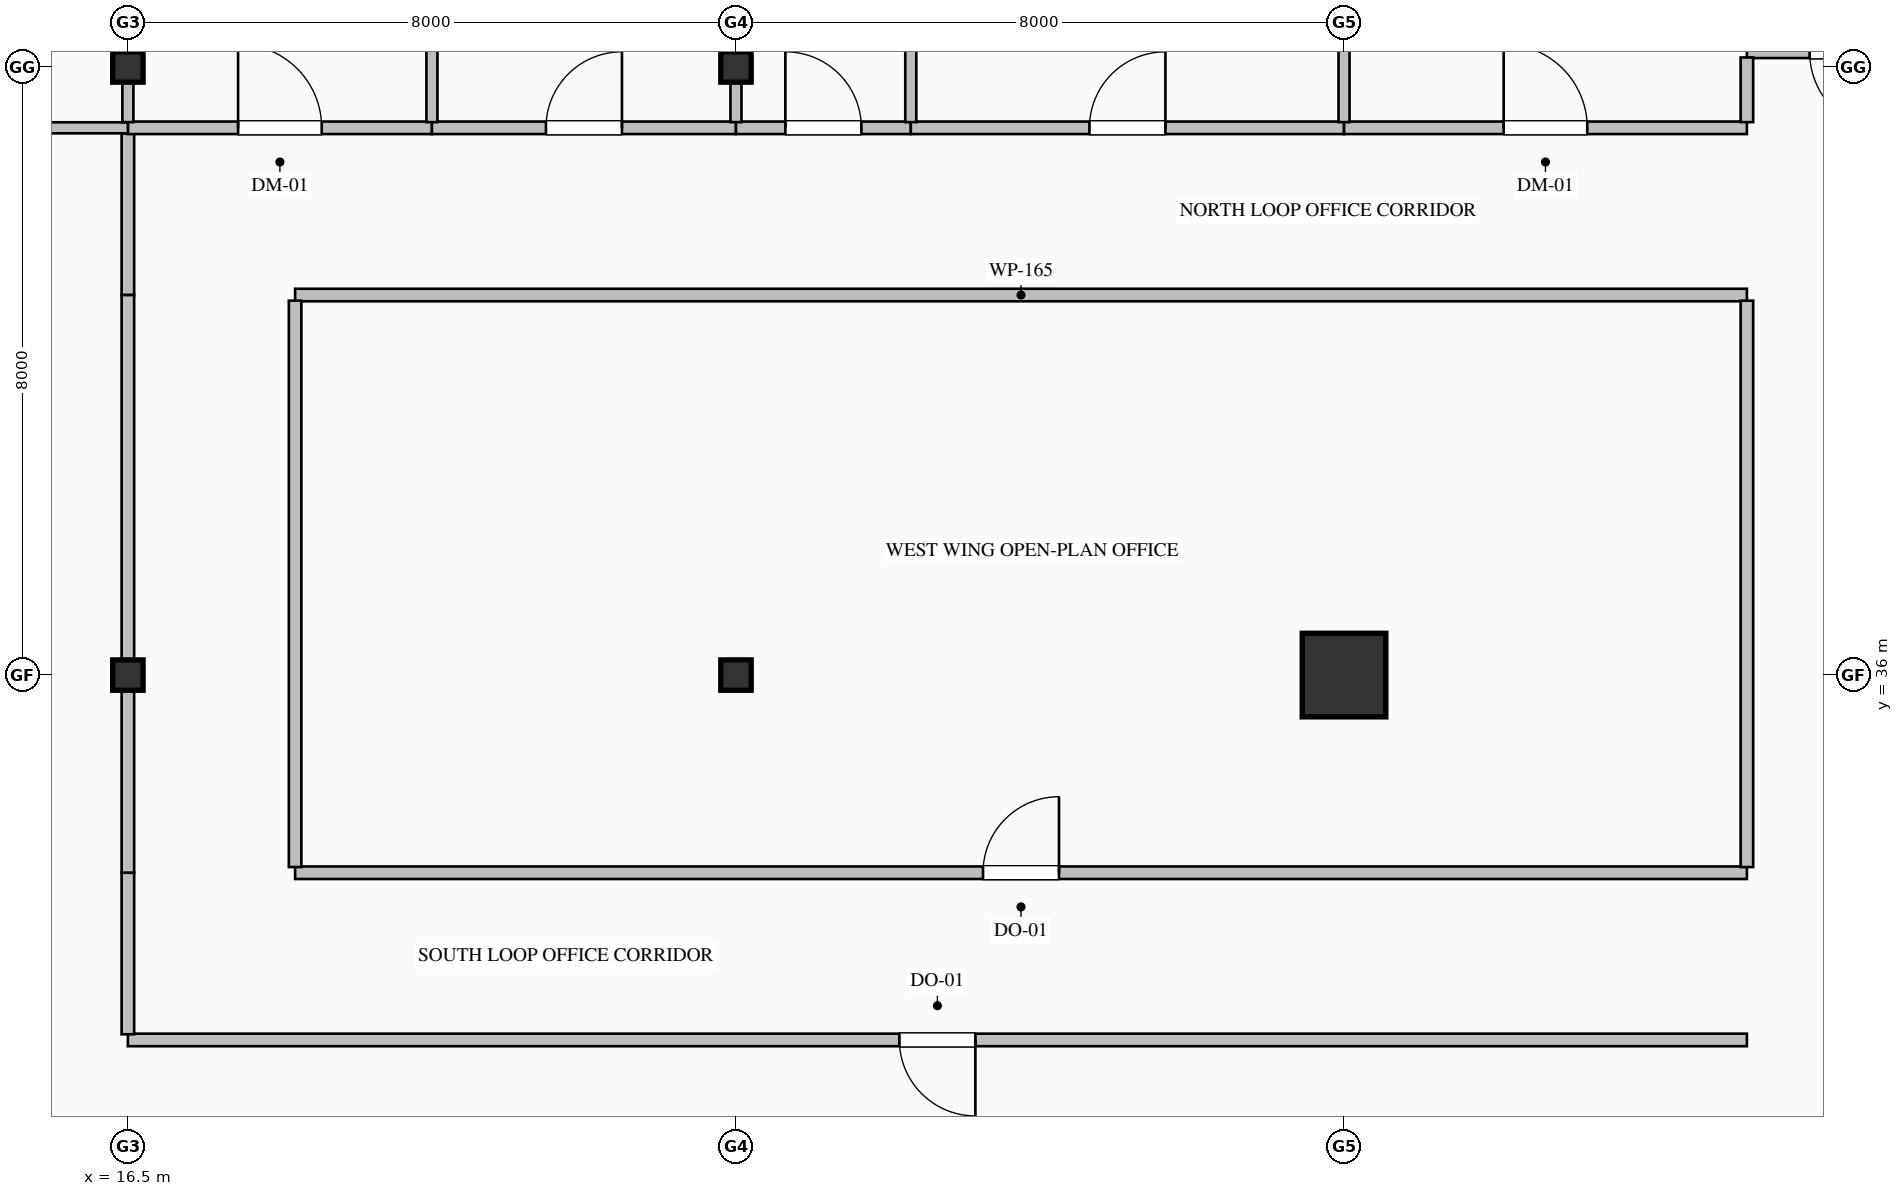
"""IFC4 building model, lengths in metres.
Left out: names, types, materials, properties, quantities, classifications, styles, units other than length and angle.
Written with IfcOpenShell. Run it as: python <this file> out.ifc"""

import sys

from ifc_helpers import new_model, si_unit, direction, frame, frame_2d, origin, origin_2d, place, context, subcontext, project, spatial, rectangle, hollow_rectangle, i_section, extrude, element, fill, save


model = new_model("IFC4")
c1 = context("Model", 3, precision=1e-05, world=origin(), true_north=direction((0.0, 1.0)))
c2 = subcontext(c1, "Body", "Model", "MODEL_VIEW")
j1 = project(units=[si_unit("LENGTHUNIT", "METRE"), si_unit("PLANEANGLEUNIT", "RADIAN")], contexts=[c1])
p1 = place(None, origin())
s1 = spatial("IfcSite", under=j1, at=p1, CompositionType="ELEMENT")
p2 = place(p1, origin())
s2 = spatial("IfcBuilding", under=s1, at=p2, CompositionType="ELEMENT")
p3 = place(p2, frame((0.0, 0.0, 127.0)))
s3 = spatial("IfcBuildingStorey", under=s2, at=p3, CompositionType="ELEMENT", Elevation=127.0)
for number, where, z_axis, x_axis in (
    (1, (16.5, 36.0, 0.0), (0.0, 0.0, 1.0), (1.0, 0.0, 0.0)),
    (2, (16.5, 44.0, 0.0), (0.0, 0.0, 1.0), (1.0, 0.0, 0.0)),
    (3, (24.5, 36.0, 0.0), (0.0, 0.0, 1.0), (1.0, 0.0, 0.0)),
    (4, (24.5, 44.0, 0.0), (0.0, 0.0, 1.0), (1.0, 0.0, 0.0)),
):
    element("IfcColumn", number, at=place(p3, frame(where, z_axis=z_axis, x_axis=x_axis)), inside=s3, PredefinedType="COLUMN", context=c2, shape_type="SweptSolid", body=[
        extrude(i_section(OverallWidth=0.4, OverallDepth=0.4, WebThickness=0.013, FlangeThickness=0.021, FilletRadius=0.022, at=origin_2d()), origin(), (0.0, 0.0, 1.0), 4.0),
    ])
p4 = place(p3, frame((32.5, 36.0, 0.0), z_axis=(0.0, 0.0, 1.0), x_axis=(1.0, 0.0, 0.0)))
e5 = element("IfcColumn", 5, at=p4, inside=s3, PredefinedType="COLUMN", context=c2, shape_type="SweptSolid", body=[
    extrude(hollow_rectangle(XDim=1.1, YDim=1.1, WallThickness=0.04, at=origin_2d()), origin(), (0.0, 0.0, 1.0), 4.0),
])
p5 = place(p3, frame((40.5, 44.2, 0.0), z_axis=(0.0, 0.0, 1.0), x_axis=(-1.0, 0.0, 0.0)))
e6 = element("IfcWall", 6, at=p5, inside=s3, PredefinedType="PARTITIONING", context=c2, shape_type="SweptSolid", body=[
    extrude(rectangle(XDim=2.7, YDim=0.165, at=frame_2d((1.35, 0.0))), origin(), (0.0, 0.0, 1.0), 3.765),
])
p6 = place(p5, frame((0.825, 0.0, 0.0)))
e7 = element("IfcOpeningElement", 7, at=p6, cuts=e6, PredefinedType="OPENING", context=c2, shape_type="SweptSolid", body=[
    extrude(rectangle(XDim=1.05, YDim=2.15, at=frame_2d((0.525, 1.075))), frame((0.0, 0.093, 0.0), z_axis=(0.0, -1.0, 0.0), x_axis=(1.0, 0.0, 0.0)), (0.0, 0.0, 1.0), 0.185),
])
p7 = place(p3, frame((37.8, 31.2, 0.0), z_axis=(0.0, 0.0, 1.0), x_axis=(-1.0, 0.0, 0.0)))
e8 = element("IfcWall", 8, at=p7, inside=s3, PredefinedType="PARTITIONING", context=c2, shape_type="SweptSolid", body=[
    extrude(rectangle(XDim=21.3, YDim=0.165, at=frame_2d((10.65, 0.0))), origin(), (0.0, 0.0, 1.0), 3.765),
])
p8 = place(p7, frame((10.15, 0.0, 0.0)))
e9 = element("IfcOpeningElement", 9, at=p8, cuts=e8, PredefinedType="OPENING", context=c2, shape_type="SweptSolid", body=[
    extrude(rectangle(XDim=1.0, YDim=2.15, at=frame_2d((0.5, 1.075))), frame((0.0, 0.093, 0.0), z_axis=(0.0, -1.0, 0.0), x_axis=(1.0, 0.0, 0.0)), (0.0, 0.0, 1.0), 0.185),
])
p9 = place(p3, frame((16.5, 31.274, 0.0), z_axis=(0.0, 0.0, 1.0), x_axis=(0.0, 1.0, 0.0)))
e10 = element("IfcWall", 10, at=p9, inside=s3, PredefinedType="PARTITIONING", context=c2, shape_type="SweptSolid", body=[
    extrude(rectangle(XDim=2.125, YDim=0.165, at=frame_2d((1.063, 0.0))), origin(), (0.0, 0.0, 1.0), 3.157),
])
p10 = place(p3, frame((18.7, 33.4, 0.0), z_axis=(0.0, 0.0, 1.0), x_axis=(1.0, 0.0, 0.0)))
e11 = element("IfcWall", 11, at=p10, inside=s3, PredefinedType="PARTITIONING", context=c2, shape_type="SweptSolid", body=[
    extrude(rectangle(XDim=19.1, YDim=0.165, at=frame_2d((9.55, 0.0))), origin(), (0.0, 0.0, 1.0), 3.765),
])
p11 = place(p10, frame((9.05, 0.0, 0.0)))
e12 = element("IfcOpeningElement", 12, at=p11, cuts=e11, PredefinedType="OPENING", context=c2, shape_type="SweptSolid", body=[
    extrude(rectangle(XDim=1.0, YDim=2.15, at=frame_2d((0.5, 1.075))), frame((0.0, 0.093, 0.0), z_axis=(0.0, -1.0, 0.0), x_axis=(1.0, 0.0, 0.0)), (0.0, 0.0, 1.0), 0.185),
])
p12 = place(p3, frame((16.5, 41.0, 0.0), z_axis=(0.0, 0.0, 1.0), x_axis=(0.0, 1.0, 0.0)))
e13 = element("IfcWall", 13, at=p12, inside=s3, PredefinedType="PARTITIONING", context=c2, shape_type="SweptSolid", body=[
    extrude(rectangle(XDim=2.125, YDim=0.165, at=frame_2d((1.063, 0.0))), origin(), (0.0, 0.0, 1.0), 3.157),
])
p13 = place(p3, frame((37.8, 41.0, 0.0), z_axis=(0.0, 0.0, 1.0), x_axis=(-1.0, 0.0, 0.0)))
e14 = element("IfcWall", 14, at=p13, inside=s3, PredefinedType="PARTITIONING", context=c2, shape_type="SweptSolid", body=[
    extrude(rectangle(XDim=19.1, YDim=0.165, at=frame_2d((9.55, 0.0))), origin(), (0.0, 0.0, 1.0), 3.765),
])
p14 = place(p3, frame((16.5, 43.2, 0.0), z_axis=(0.0, 0.0, 1.0), x_axis=(1.0, 0.0, 0.0)))
e15 = element("IfcWall", 15, at=p14, inside=s3, PredefinedType="PARTITIONING", context=c2, shape_type="SweptSolid", body=[
    extrude(rectangle(XDim=4.0, YDim=0.165, at=frame_2d((2.0, 0.0))), origin(), (0.0, 0.0, 1.0), 3.765),
])
p15 = place(p14, frame((1.45, 0.0, 0.0)))
e16 = element("IfcOpeningElement", 16, at=p15, cuts=e15, PredefinedType="OPENING", context=c2, shape_type="SweptSolid", body=[
    extrude(rectangle(XDim=1.1, YDim=2.2, at=frame_2d((0.55, 1.1))), frame((0.0, 0.093, 0.0), z_axis=(0.0, -1.0, 0.0), x_axis=(1.0, 0.0, 0.0)), (0.0, 0.0, 1.0), 0.185),
])
p16 = place(p3, frame((20.5, 43.2, 0.0), z_axis=(0.0, 0.0, 1.0), x_axis=(1.0, 0.0, 0.0)))
e17 = element("IfcWall", 17, at=p16, inside=s3, PredefinedType="PARTITIONING", context=c2, shape_type="SweptSolid", body=[
    extrude(rectangle(XDim=4.0, YDim=0.165, at=frame_2d((2.0, 0.0))), origin(), (0.0, 0.0, 1.0), 3.765),
])
p17 = place(p16, frame((1.5, 0.0, 0.0)))
e18 = element("IfcOpeningElement", 18, at=p17, cuts=e17, PredefinedType="OPENING", context=c2, shape_type="SweptSolid", body=[
    extrude(rectangle(XDim=1.0, YDim=2.15, at=frame_2d((0.5, 1.075))), frame((0.0, 0.093, 0.0), z_axis=(0.0, -1.0, 0.0), x_axis=(1.0, 0.0, 0.0)), (0.0, 0.0, 1.0), 0.185),
])
p18 = place(p3, frame((24.5, 43.2, 0.0), z_axis=(0.0, 0.0, 1.0), x_axis=(1.0, 0.0, 0.0)))
e19 = element("IfcWall", 19, at=p18, inside=s3, PredefinedType="PARTITIONING", context=c2, shape_type="SweptSolid", body=[
    extrude(rectangle(XDim=2.3, YDim=0.165, at=frame_2d((1.15, 0.0))), origin(), (0.0, 0.0, 1.0), 3.765),
])
p19 = place(p18, frame((0.65, 0.0, 0.0)))
e20 = element("IfcOpeningElement", 20, at=p19, cuts=e19, PredefinedType="OPENING", context=c2, shape_type="SweptSolid", body=[
    extrude(rectangle(XDim=1.0, YDim=2.15, at=frame_2d((0.5, 1.075))), frame((0.0, 0.093, 0.0), z_axis=(0.0, -1.0, 0.0), x_axis=(1.0, 0.0, 0.0)), (0.0, 0.0, 1.0), 0.185),
])
p20 = place(p3, frame((26.8, 43.2, 0.0), z_axis=(0.0, 0.0, 1.0), x_axis=(1.0, 0.0, 0.0)))
e21 = element("IfcWall", 21, at=p20, inside=s3, PredefinedType="PARTITIONING", context=c2, shape_type="SweptSolid", body=[
    extrude(rectangle(XDim=5.7, YDim=0.165, at=frame_2d((2.85, 0.0))), origin(), (0.0, 0.0, 1.0), 3.765),
])
p21 = place(p20, frame((2.35, 0.0, 0.0)))
e22 = element("IfcOpeningElement", 22, at=p21, cuts=e21, PredefinedType="OPENING", context=c2, shape_type="SweptSolid", body=[
    extrude(rectangle(XDim=1.0, YDim=2.15, at=frame_2d((0.5, 1.075))), frame((0.0, 0.093, 0.0), z_axis=(0.0, -1.0, 0.0), x_axis=(1.0, 0.0, 0.0)), (0.0, 0.0, 1.0), 0.185),
])
p22 = place(p3, frame((32.5, 43.2, 0.0), z_axis=(0.0, 0.0, 1.0), x_axis=(1.0, 0.0, 0.0)))
e23 = element("IfcWall", 23, at=p22, inside=s3, PredefinedType="PARTITIONING", context=c2, shape_type="SweptSolid", body=[
    extrude(rectangle(XDim=5.3, YDim=0.165, at=frame_2d((2.65, 0.0))), origin(), (0.0, 0.0, 1.0), 3.765),
])
p23 = place(p22, frame((2.1, 0.0, 0.0)))
e24 = element("IfcOpeningElement", 24, at=p23, cuts=e23, PredefinedType="OPENING", context=c2, shape_type="SweptSolid", body=[
    extrude(rectangle(XDim=1.1, YDim=2.2, at=frame_2d((0.55, 1.1))), frame((0.0, 0.093, 0.0), z_axis=(0.0, -1.0, 0.0), x_axis=(1.0, 0.0, 0.0)), (0.0, 0.0, 1.0), 0.185),
])
p24 = place(p3, frame((16.5, 33.4, 0.0), z_axis=(0.0, 0.0, 1.0), x_axis=(0.0, 1.0, 0.0)))
e25 = element("IfcWall", 25, at=p24, inside=s3, PredefinedType="PARTITIONING", context=c2, shape_type="SweptSolid", body=[
    extrude(rectangle(XDim=7.6, YDim=0.165, at=frame_2d((3.8, 0.0))), origin(), (0.0, 0.0, 1.0), 3.157),
])
for number, where, z_axis, x_axis in (
    (26, (18.7, 40.926, 0.0), (0.0, 0.0, 1.0), (0.0, -1.0, 0.0)),
    (27, (37.8, 33.475, 0.0), (0.0, 0.0, 1.0), (0.0, 1.0, 0.0)),
):
    element("IfcWall", number, at=place(p3, frame(where, z_axis=z_axis, x_axis=x_axis)), inside=s3, PredefinedType="PARTITIONING", context=c2, shape_type="SweptSolid", body=[
        extrude(rectangle(XDim=7.451, YDim=0.165, at=frame_2d((3.726, 0.0))), origin(), (0.0, 0.0, 1.0), 3.765),
    ])
p25 = place(p3, frame((37.8, 43.274, 0.0), z_axis=(0.0, 0.0, 1.0), x_axis=(0.0, 1.0, 0.0)))
e28 = element("IfcWall", 28, at=p25, inside=s3, PredefinedType="PARTITIONING", context=c2, shape_type="SweptSolid", body=[
    extrude(rectangle(XDim=0.851, YDim=0.165, at=frame_2d((0.426, 0.0))), origin(), (0.0, 0.0, 1.0), 3.765),
])
p26 = place(p3, frame((12.8, 43.2, 0.0), z_axis=(0.0, 0.0, 1.0), x_axis=(1.0, 0.0, 0.0)))
e29 = element("IfcWall", 29, at=p26, inside=s3, PredefinedType="PARTITIONING", context=c2, shape_type="SweptSolid", body=[
    extrude(rectangle(XDim=3.7, YDim=0.145, at=frame_2d((1.85, 0.0))), origin(), (0.0, 0.0, 1.0), 3.765),
])
p27 = place(p3, frame((16.5, 51.668, 0.0), z_axis=(0.0, 0.0, 1.0), x_axis=(0.0, -1.0, 0.0)))
e30 = element("IfcWall", 30, at=p27, inside=s3, PredefinedType="PARTITIONING", context=c2, shape_type="SweptSolid", body=[
    extrude(rectangle(XDim=8.394, YDim=0.145, at=frame_2d((4.197, 0.0))), origin(), (0.0, 0.0, 1.0), 3.157),
])
p28 = place(p27, frame((3.697, 0.0, 0.0)))
e31 = element("IfcOpeningElement", 31, at=p28, cuts=e30, PredefinedType="OPENING", context=c2, shape_type="SweptSolid", body=[
    extrude(rectangle(XDim=1.0, YDim=2.15, at=frame_2d((0.5, 1.075))), frame((0.0, 0.083, 0.0), z_axis=(0.0, -1.0, 0.0), x_axis=(1.0, 0.0, 0.0)), (0.0, 0.0, 1.0), 0.165),
])
p29 = place(p3, frame((20.5, 51.668, 0.0), z_axis=(0.0, 0.0, 1.0), x_axis=(0.0, -1.0, 0.0)))
e32 = element("IfcWall", 32, at=p29, inside=s3, PredefinedType="PARTITIONING", context=c2, shape_type="SweptSolid", body=[
    extrude(rectangle(XDim=8.394, YDim=0.145, at=frame_2d((4.197, 0.0))), origin(), (0.0, 0.0, 1.0), 3.765),
])
p30 = place(p3, frame((24.5, 51.668, 0.0), z_axis=(0.0, 0.0, 1.0), x_axis=(0.0, -1.0, 0.0)))
e33 = element("IfcWall", 33, at=p30, inside=s3, PredefinedType="PARTITIONING", context=c2, shape_type="SweptSolid", body=[
    extrude(rectangle(XDim=8.394, YDim=0.145, at=frame_2d((4.197, 0.0))), origin(), (0.0, 0.0, 1.0), 3.157),
])
for number, where, z_axis, x_axis in (
    (34, (26.8, 51.668, 0.0), (0.0, 0.0, 1.0), (0.0, -1.0, 0.0)),
    (35, (32.5, 51.668, 0.0), (0.0, 0.0, 1.0), (0.0, -1.0, 0.0)),
):
    element("IfcWall", number, at=place(p3, frame(where, z_axis=z_axis, x_axis=x_axis)), inside=s3, PredefinedType="PARTITIONING", context=c2, shape_type="SweptSolid", body=[
        extrude(rectangle(XDim=8.394, YDim=0.145, at=frame_2d((4.197, 0.0))), origin(), (0.0, 0.0, 1.0), 3.765),
    ])
p31 = place(p6, origin())
e36 = element("IfcDoor", 36, at=p31, inside=s3, OperationType="SINGLE_SWING_LEFT", PredefinedType="DOOR", context=c2, shape_type="SweptSolid", body=[
    extrude(rectangle(XDim=1.05, YDim=2.15, at=frame_2d((0.525, 1.075))), frame((0.0, 0.025, 0.0), z_axis=(0.0, -1.0, 0.0), x_axis=(1.0, 0.0, 0.0)), (0.0, 0.0, 1.0), 0.05),
])
fill(e7, e36)
p32 = place(p8, origin())
e37 = element("IfcDoor", 37, at=p32, inside=s3, OperationType="SINGLE_SWING_LEFT", PredefinedType="DOOR", context=c2, shape_type="SweptSolid", body=[
    extrude(rectangle(XDim=1.0, YDim=2.15, at=frame_2d((0.5, 1.075))), frame((0.0, 0.025, 0.0), z_axis=(0.0, -1.0, 0.0), x_axis=(1.0, 0.0, 0.0)), (0.0, 0.0, 1.0), 0.05),
])
fill(e9, e37)
p33 = place(p11, origin())
e38 = element("IfcDoor", 38, at=p33, inside=s3, OperationType="SINGLE_SWING_RIGHT", PredefinedType="DOOR", context=c2, shape_type="SweptSolid", body=[
    extrude(rectangle(XDim=1.0, YDim=2.15, at=frame_2d((0.5, 1.075))), frame((0.0, 0.025, 0.0), z_axis=(0.0, -1.0, 0.0), x_axis=(1.0, 0.0, 0.0)), (0.0, 0.0, 1.0), 0.05),
])
fill(e12, e38)
p34 = place(p15, origin())
e39 = element("IfcDoor", 39, at=p34, inside=s3, OperationType="SINGLE_SWING_LEFT", PredefinedType="DOOR", context=c2, shape_type="SweptSolid", body=[
    extrude(rectangle(XDim=1.1, YDim=2.2, at=frame_2d((0.55, 1.1))), frame((0.0, 0.025, 0.0), z_axis=(0.0, -1.0, 0.0), x_axis=(1.0, 0.0, 0.0)), (0.0, 0.0, 1.0), 0.05),
])
fill(e16, e39)
p35 = place(p17, origin())
e40 = element("IfcDoor", 40, at=p35, inside=s3, OperationType="SINGLE_SWING_RIGHT", PredefinedType="DOOR", context=c2, shape_type="SweptSolid", body=[
    extrude(rectangle(XDim=1.0, YDim=2.15, at=frame_2d((0.5, 1.075))), frame((0.0, 0.025, 0.0), z_axis=(0.0, -1.0, 0.0), x_axis=(1.0, 0.0, 0.0)), (0.0, 0.0, 1.0), 0.05),
])
fill(e18, e40)
p36 = place(p19, origin())
e41 = element("IfcDoor", 41, at=p36, inside=s3, OperationType="SINGLE_SWING_LEFT", PredefinedType="DOOR", context=c2, shape_type="SweptSolid", body=[
    extrude(rectangle(XDim=1.0, YDim=2.15, at=frame_2d((0.5, 1.075))), frame((0.0, 0.025, 0.0), z_axis=(0.0, -1.0, 0.0), x_axis=(1.0, 0.0, 0.0)), (0.0, 0.0, 1.0), 0.05),
])
fill(e20, e41)
p37 = place(p21, origin())
e42 = element("IfcDoor", 42, at=p37, inside=s3, OperationType="SINGLE_SWING_RIGHT", PredefinedType="DOOR", context=c2, shape_type="SweptSolid", body=[
    extrude(rectangle(XDim=1.0, YDim=2.15, at=frame_2d((0.5, 1.075))), frame((0.0, 0.025, 0.0), z_axis=(0.0, -1.0, 0.0), x_axis=(1.0, 0.0, 0.0)), (0.0, 0.0, 1.0), 0.05),
])
fill(e22, e42)
p38 = place(p23, origin())
e43 = element("IfcDoor", 43, at=p38, inside=s3, OperationType="SINGLE_SWING_LEFT", PredefinedType="DOOR", context=c2, shape_type="SweptSolid", body=[
    extrude(rectangle(XDim=1.1, YDim=2.2, at=frame_2d((0.55, 1.1))), frame((0.0, 0.025, 0.0), z_axis=(0.0, -1.0, 0.0), x_axis=(1.0, 0.0, 0.0)), (0.0, 0.0, 1.0), 0.05),
])
fill(e24, e43)
save(model, sys.argv[1])
